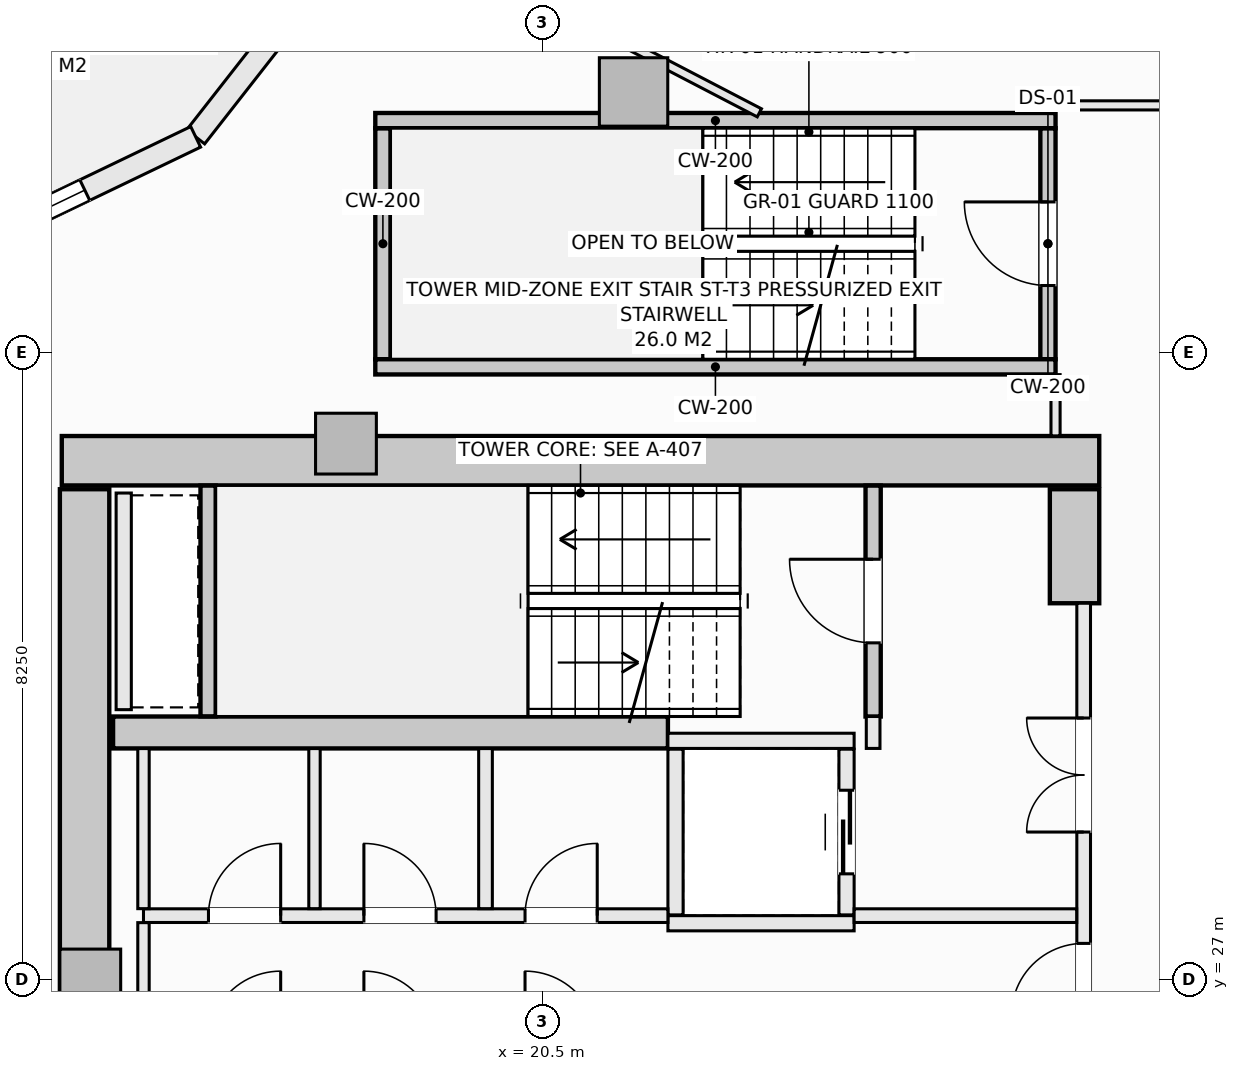
"""IFC4 building model, lengths in metres.
Left out: names, types, materials, properties, quantities, classifications, styles, units other than length and angle.
Written with IfcOpenShell. Run it as: python <this file> out.ifc"""

import sys

from ifc_helpers import new_model, si_unit, direction, frame, frame_2d, origin, origin_2d, place, context, subcontext, project, spatial, rectangle, extrude, element, fill, save


model = new_model("IFC4")
c1 = context("Model", 3, precision=1e-05, world=origin(), true_north=direction((0.0, 1.0)))
c2 = subcontext(c1, "Body", "Model", "MODEL_VIEW")
j1 = project(units=[si_unit("LENGTHUNIT", "METRE"), si_unit("PLANEANGLEUNIT", "RADIAN")], contexts=[c1])
p1 = place(None, origin())
s1 = spatial("IfcSite", under=j1, at=p1, CompositionType="ELEMENT")
p2 = place(p1, origin())
s2 = spatial("IfcBuilding", under=s1, at=p2, CompositionType="ELEMENT")
p3 = place(p2, frame((0.0, 0.0, 169.9)))
s3 = spatial("IfcBuildingStorey", under=s2, at=p3, CompositionType="ELEMENT", Elevation=169.9)
p4 = place(p3, frame((14.175, 33.825, -0.27), z_axis=(0.0, 0.0, 1.0), x_axis=(1.0, 0.0, 0.0)))
e1 = element("IfcWall", 1, at=p4, inside=s3, PredefinedType="SHEAR", context=c2, shape_type="SweptSolid", body=[
    extrude(rectangle(XDim=13.65, YDim=0.65, at=frame_2d((6.825, 0.0))), origin(), (0.0, 0.0, 1.0), 3.4),
])
p5 = place(p3, frame((14.475, 20.55, -0.27), z_axis=(0.0, 0.0, 1.0), x_axis=(0.0, 1.0, 0.0)))
e2 = element("IfcWall", 2, at=p5, inside=s3, PredefinedType="SHEAR", context=c2, shape_type="SweptSolid", body=[
    extrude(rectangle(XDim=12.9, YDim=0.65, at=frame_2d((6.45, 0.0))), origin(), (0.0, 0.0, 1.0), 3.4),
])
p6 = place(p3, frame((27.5, 31.95, -0.27), z_axis=(0.0, 0.0, 1.0), x_axis=(0.0, 1.0, 0.0)))
e3 = element("IfcWall", 3, at=p6, inside=s3, PredefinedType="SHEAR", context=c2, shape_type="SweptSolid", body=[
    extrude(rectangle(XDim=1.5, YDim=0.65, at=frame_2d((0.75, 0.0))), origin(), (0.0, 0.0, 1.0), 3.4),
])
p7 = place(p3, frame((14.85, 30.25, -0.27), z_axis=(0.0, 0.0, 1.0), x_axis=(1.0, 0.0, 0.0)))
e4 = element("IfcWall", 4, at=p7, inside=s3, PredefinedType="SHEAR", context=c2, shape_type="SweptSolid", body=[
    extrude(rectangle(XDim=7.3, YDim=0.42, at=frame_2d((3.65, 0.0))), origin(), (0.0, 0.0, 1.0), 3.4),
])
p8 = place(p3, frame((21.698, 38.677, -0.27), z_axis=(0.0, 0.0, 1.0), x_axis=(1.0, 0.0, 0.0)))
e5 = element("IfcColumn", 5, at=p8, inside=s3, PredefinedType="COLUMN", context=c2, shape_type="SweptSolid", body=[
    extrude(rectangle(XDim=0.9, YDim=0.9, at=origin_2d()), origin(), (0.0, 0.0, 1.0), 3.4),
])
for number, where, z_axis, x_axis in (
    (6, (17.914, 34.05, -0.27), (0.0, 0.0, 1.0), (1.0, 0.0, 0.0)),
    (7, (14.55, 27.0, -0.27), (0.0, 0.0, 1.0), (1.0, 0.0, 0.0)),
):
    element("IfcColumn", number, at=place(p3, frame(where, z_axis=z_axis, x_axis=x_axis)), inside=s3, PredefinedType="PILASTER", context=c2, shape_type="SweptSolid", body=[
        extrude(rectangle(XDim=0.8, YDim=0.8, at=origin_2d()), origin(), (0.0, 0.0, 1.0), 3.4),
    ])
p9 = place(p3, frame((15.937, 38.086, 0.0), z_axis=(0.0, 0.0, 1.0), x_axis=(0.616429245738, 0.787410302828, 0.0)))
e8 = element("IfcWall", 8, at=p9, inside=s3, PredefinedType="SOLIDWALL", context=c2, shape_type="SweptSolid", body=[
    extrude(rectangle(XDim=5.223, YDim=0.3, at=frame_2d((2.612, 0.0))), origin(), (0.0, 0.0, 1.0), 2.653),
])
p10 = place(p9, frame((1.712, 0.0, 0.0)))
e9 = element("IfcOpeningElement", 9, at=p10, cuts=e8, PredefinedType="OPENING", context=c2, shape_type="SweptSolid", body=[
    extrude(rectangle(XDim=1.8, YDim=2.25, at=frame_2d((0.9, 1.125))), frame((0.0, 0.16, 0.0), z_axis=(0.0, -1.0, 0.0), x_axis=(1.0, 0.0, 0.0)), (0.0, 0.0, 1.0), 0.32),
])
p11 = place(p3, frame((11.127, 35.775, 0.0), z_axis=(0.0, 0.0, 1.0), x_axis=(0.901353070301, 0.433085029363, 0.0)))
e10 = element("IfcWall", 10, at=p11, inside=s3, PredefinedType="SOLIDWALL", context=c2, shape_type="SweptSolid", body=[
    extrude(rectangle(XDim=5.336, YDim=0.3, at=frame_2d((2.668, 0.0))), origin(), (0.0, 0.0, 1.0), 2.653),
])
p12 = place(p11, frame((1.618, 0.0, 0.74)))
e11 = element("IfcOpeningElement", 11, at=p12, cuts=e10, PredefinedType="OPENING", context=c2, shape_type="SweptSolid", body=[
    extrude(rectangle(XDim=2.1, YDim=1.7, at=frame_2d((1.05, 0.85))), frame((0.0, 0.16, 0.0), z_axis=(0.0, -1.0, 0.0), x_axis=(1.0, 0.0, 0.0)), (0.0, 0.0, 1.0), 0.32),
])
p13 = place(p3, frame((24.85, 30.46, -0.27), z_axis=(0.0, 0.0, 1.0), x_axis=(0.0, 1.0, 0.0)))
e12 = element("IfcWall", 12, at=p13, inside=s3, PredefinedType="SHEAR", context=c2, shape_type="SweptSolid", body=[
    extrude(rectangle(XDim=3.038, YDim=0.2, at=frame_2d((1.519, 0.0))), origin(), (0.0, 0.0, 1.0), 3.4),
])
p14 = place(p13, frame((0.969, 0.0, 0.27)))
e13 = element("IfcOpeningElement", 13, at=p14, cuts=e12, PredefinedType="OPENING", context=c2, shape_type="SweptSolid", body=[
    extrude(rectangle(XDim=1.1, YDim=2.15, at=frame_2d((0.55, 1.075))), frame((0.0, 0.11, 0.0), z_axis=(0.0, -1.0, 0.0), x_axis=(1.0, 0.0, 0.0)), (0.0, 0.0, 1.0), 0.22),
])
p15 = place(p3, frame((16.1, 30.462, -0.27), z_axis=(0.0, 0.0, 1.0), x_axis=(0.0, 1.0, 0.0)))
e14 = element("IfcWall", 14, at=p15, inside=s3, PredefinedType="SHEAR", context=c2, shape_type="SweptSolid", body=[
    extrude(rectangle(XDim=3.036, YDim=0.2, at=frame_2d((1.518, 0.0))), origin(), (0.0, 0.0, 1.0), 3.4),
])
p16 = place(p3, frame((27.15, 35.16, -0.27), z_axis=(0.0, 0.0, 1.0), x_axis=(0.0, 1.0, 0.0)))
e15 = element("IfcWall", 15, at=p16, inside=s3, PredefinedType="SHEAR", context=c2, shape_type="SweptSolid", body=[
    extrude(rectangle(XDim=3.04, YDim=0.2, at=frame_2d((1.52, 0.0))), origin(), (0.0, 0.0, 1.0), 3.4),
])
p17 = place(p16, frame((0.97, 0.0, 0.27)))
e16 = element("IfcOpeningElement", 16, at=p17, cuts=e15, PredefinedType="OPENING", context=c2, shape_type="SweptSolid", body=[
    extrude(rectangle(XDim=1.1, YDim=2.15, at=frame_2d((0.55, 1.075))), frame((0.0, 0.11, 0.0), z_axis=(0.0, -1.0, 0.0), x_axis=(1.0, 0.0, 0.0)), (0.0, 0.0, 1.0), 0.22),
])
p18 = place(p3, frame((18.4, 35.16, -0.27), z_axis=(0.0, 0.0, 1.0), x_axis=(0.0, 1.0, 0.0)))
e17 = element("IfcWall", 17, at=p18, inside=s3, PredefinedType="SHEAR", context=c2, shape_type="SweptSolid", body=[
    extrude(rectangle(XDim=3.04, YDim=0.2, at=frame_2d((1.52, 0.0))), origin(), (0.0, 0.0, 1.0), 3.4),
])
for number, where, z_axis, x_axis in (
    (18, (18.3, 38.3, -0.27), (0.0, 0.0, 1.0), (1.0, 0.0, 0.0)),
    (19, (18.3, 35.06, -0.27), (0.0, 0.0, 1.0), (1.0, 0.0, 0.0)),
):
    element("IfcWall", number, at=place(p3, frame(where, z_axis=z_axis, x_axis=x_axis)), inside=s3, PredefinedType="SHEAR", context=c2, shape_type="SweptSolid", body=[
        extrude(rectangle(XDim=8.95, YDim=0.2, at=frame_2d((4.475, 0.0))), origin(), (0.0, 0.0, 1.0), 3.4),
    ])
for number, where, z_axis, x_axis in (
    (20, (22.15, 30.14, 0.0), (0.0, 0.0, 1.0), (1.0, 0.0, 0.0)),
    (21, (22.15, 27.74, 0.0), (0.0, 0.0, 1.0), (1.0, 0.0, 0.0)),
):
    element("IfcWall", number, at=place(p3, frame(where, z_axis=z_axis, x_axis=x_axis)), inside=s3, PredefinedType="SOLIDWALL", context=c2, shape_type="SweptSolid", body=[
        extrude(rectangle(XDim=2.45, YDim=0.2, at=frame_2d((1.225, 0.0))), origin(), (0.0, 0.0, 1.0), 3.13),
    ])
p19 = place(p3, frame((22.25, 27.85, 0.0), z_axis=(0.0, 0.0, 1.0), x_axis=(0.0, 1.0, 0.0)))
e22 = element("IfcWall", 22, at=p19, inside=s3, PredefinedType="SOLIDWALL", context=c2, shape_type="SweptSolid", body=[
    extrude(rectangle(XDim=2.18, YDim=0.2, at=frame_2d((1.09, 0.0))), origin(), (0.0, 0.0, 1.0), 3.13),
])
p20 = place(p3, frame((24.5, 27.85, 0.0), z_axis=(0.0, 0.0, 1.0), x_axis=(0.0, 1.0, 0.0)))
e23 = element("IfcWall", 23, at=p20, inside=s3, PredefinedType="SOLIDWALL", context=c2, shape_type="SweptSolid", body=[
    extrude(rectangle(XDim=2.18, YDim=0.2, at=frame_2d((1.09, 0.0))), origin(), (0.0, 0.0, 1.0), 3.13),
])
p21 = place(p20, frame((0.54, 0.0, 0.0)))
e24 = element("IfcOpeningElement", 24, at=p21, cuts=e23, PredefinedType="OPENING", context=c2, shape_type="SweptSolid", body=[
    extrude(rectangle(XDim=1.1, YDim=2.2, at=frame_2d((0.55, 1.1))), frame((0.0, 0.11, 0.0), z_axis=(0.0, -1.0, 0.0), x_axis=(1.0, 0.0, 0.0)), (0.0, 0.0, 1.0), 0.22),
])
p22 = place(p3, frame((14.99, 30.55, 0.0), z_axis=(0.0, 0.0, 1.0), x_axis=(0.0, 1.0, 0.0)))
e25 = element("IfcWall", 25, at=p22, inside=s3, PredefinedType="SOLIDWALL", context=c2, shape_type="SweptSolid", body=[
    extrude(rectangle(XDim=2.85, YDim=0.2, at=frame_2d((1.425, 0.0))), origin(), (0.0, 0.0, 1.0), 3.13),
])
p23 = place(p3, frame((24.85, 30.04, 0.0), z_axis=(0.0, 0.0, 1.0), x_axis=(0.0, 1.0, 0.0)))
e26 = element("IfcWall", 26, at=p23, inside=s3, PredefinedType="SOLIDWALL", context=c2, shape_type="SweptSolid", body=[
    extrude(rectangle(XDim=0.42, YDim=0.18, at=frame_2d((0.21, 0.0))), origin(), (0.0, 0.0, 1.0), 3.13),
])
p24 = place(p3, frame((27.62, 22.05, 0.0), z_axis=(0.0, 0.0, 1.0), x_axis=(0.0, 1.0, 0.0)))
e27 = element("IfcWall", 27, at=p24, inside=s3, PredefinedType="SOLIDWALL", context=c2, shape_type="SweptSolid", body=[
    extrude(rectangle(XDim=9.9, YDim=0.18, at=frame_2d((4.95, 0.0))), origin(), (0.0, 0.0, 1.0), 3.13),
])
p25 = place(p24, frame((4.475, 0.0, 0.0)))
e28 = element("IfcOpeningElement", 28, at=p25, cuts=e27, PredefinedType="OPENING", context=c2, shape_type="SweptSolid", body=[
    extrude(rectangle(XDim=0.95, YDim=2.1, at=frame_2d((0.475, 1.05))), frame((0.0, 0.1, 0.0), z_axis=(0.0, -1.0, 0.0), x_axis=(1.0, 0.0, 0.0)), (0.0, 0.0, 1.0), 0.2),
])
p26 = place(p24, frame((6.89, 0.0, 0.0)))
e29 = element("IfcOpeningElement", 29, at=p26, cuts=e27, PredefinedType="OPENING", context=c2, shape_type="SweptSolid", body=[
    extrude(rectangle(XDim=1.5, YDim=2.2, at=frame_2d((0.75, 1.1))), frame((0.0, 0.1, 0.0), z_axis=(0.0, -1.0, 0.0), x_axis=(1.0, 0.0, 0.0)), (0.0, 0.0, 1.0), 0.2),
])
p27 = place(p24, frame((1.51, 0.0, 0.0)))
e30 = element("IfcOpeningElement", 30, at=p27, cuts=e27, PredefinedType="OPENING", context=c2, shape_type="SweptSolid", body=[
    extrude(rectangle(XDim=1.5, YDim=2.2, at=frame_2d((0.75, 1.1))), frame((0.0, 0.1, 0.0), z_axis=(0.0, -1.0, 0.0), x_axis=(1.0, 0.0, 0.0)), (0.0, 0.0, 1.0), 0.2),
])
p28 = place(p3, frame((15.25, 27.84, 0.0), z_axis=(0.0, 0.0, 1.0), x_axis=(1.0, 0.0, 0.0)))
e31 = element("IfcWall", 31, at=p28, inside=s3, PredefinedType="SOLIDWALL", context=c2, shape_type="SweptSolid", body=[
    extrude(rectangle(XDim=6.9, YDim=0.18, at=frame_2d((3.45, 0.0))), origin(), (0.0, 0.0, 1.0), 3.13),
])
p29 = place(p28, frame((5.02, 0.0, 0.0)))
e32 = element("IfcOpeningElement", 32, at=p29, cuts=e31, PredefinedType="OPENING", context=c2, shape_type="SweptSolid", body=[
    extrude(rectangle(XDim=0.95, YDim=2.1, at=frame_2d((0.475, 1.05))), frame((0.0, 0.1, 0.0), z_axis=(0.0, -1.0, 0.0), x_axis=(1.0, 0.0, 0.0)), (0.0, 0.0, 1.0), 0.2),
])
p30 = place(p28, frame((0.855, 0.0, 0.0)))
e33 = element("IfcOpeningElement", 33, at=p30, cuts=e31, PredefinedType="OPENING", context=c2, shape_type="SweptSolid", body=[
    extrude(rectangle(XDim=0.95, YDim=2.1, at=frame_2d((0.475, 1.05))), frame((0.0, 0.1, 0.0), z_axis=(0.0, -1.0, 0.0), x_axis=(1.0, 0.0, 0.0)), (0.0, 0.0, 1.0), 0.2),
])
p31 = place(p28, frame((2.9, 0.0, 0.0)))
e34 = element("IfcOpeningElement", 34, at=p31, cuts=e31, PredefinedType="OPENING", context=c2, shape_type="SweptSolid", body=[
    extrude(rectangle(XDim=0.95, YDim=2.1, at=frame_2d((0.475, 1.05))), frame((0.0, 0.1, 0.0), z_axis=(0.0, -1.0, 0.0), x_axis=(1.0, 0.0, 0.0)), (0.0, 0.0, 1.0), 0.2),
])
p32 = place(p3, frame((24.6, 27.84, 0.0), z_axis=(0.0, 0.0, 1.0), x_axis=(1.0, 0.0, 0.0)))
e35 = element("IfcWall", 35, at=p32, inside=s3, PredefinedType="SOLIDWALL", context=c2, shape_type="SweptSolid", body=[
    extrude(rectangle(XDim=2.928, YDim=0.18, at=frame_2d((1.464, 0.0))), origin(), (0.0, 0.0, 1.0), 3.13),
])
p33 = place(p3, frame((15.25, 26.252, 0.0), z_axis=(0.0, 0.0, 1.0), x_axis=(0.0, 1.0, 0.0)))
e36 = element("IfcWall", 36, at=p33, inside=s3, PredefinedType="PARTITIONING", context=c2, shape_type="SweptSolid", body=[
    extrude(rectangle(XDim=1.496, YDim=0.15, at=frame_2d((0.748, 0.0))), origin(), (0.0, 0.0, 1.0), 3.13),
])
p34 = place(p3, frame((15.25, 27.932, 0.0), z_axis=(0.0, 0.0, 1.0), x_axis=(0.0, 1.0, 0.0)))
e37 = element("IfcWall", 37, at=p34, inside=s3, PredefinedType="PARTITIONING", context=c2, shape_type="SweptSolid", body=[
    extrude(rectangle(XDim=2.106, YDim=0.15, at=frame_2d((1.053, 0.0))), origin(), (0.0, 0.0, 1.0), 3.13),
])
p35 = place(p3, frame((19.75, 27.932, 0.0), z_axis=(0.0, 0.0, 1.0), x_axis=(0.0, 1.0, 0.0)))
e38 = element("IfcWall", 38, at=p35, inside=s3, PredefinedType="SOLIDWALL", context=c2, shape_type="SweptSolid", body=[
    extrude(rectangle(XDim=2.106, YDim=0.18, at=frame_2d((1.053, 0.0))), origin(), (0.0, 0.0, 1.0), 3.13),
])
p36 = place(p3, frame((17.5, 27.932, 0.0), z_axis=(0.0, 0.0, 1.0), x_axis=(0.0, 1.0, 0.0)))
e39 = element("IfcWall", 39, at=p36, inside=s3, PredefinedType="PARTITIONING", context=c2, shape_type="SweptSolid", body=[
    extrude(rectangle(XDim=2.106, YDim=0.15, at=frame_2d((1.053, 0.0))), origin(), (0.0, 0.0, 1.0), 3.13),
])
p37 = place(p3, frame((27.25, 34.152, 0.0), z_axis=(0.0, 0.0, 1.0), x_axis=(0.0, 1.0, 0.0)))
e40 = element("IfcWall", 40, at=p37, inside=s3, PredefinedType="PARTITIONING", context=c2, shape_type="SweptSolid", body=[
    extrude(rectangle(XDim=0.806, YDim=0.12, at=frame_2d((0.403, 0.0))), origin(), (0.0, 0.0, 1.0), 3.13),
])
p38 = place(p3, frame((27.25, 38.5, 0.0), z_axis=(0.0, 0.0, 1.0), x_axis=(1.0, 0.0, 0.0)))
e41 = element("IfcWall", 41, at=p38, inside=s3, PredefinedType="PARTITIONING", context=c2, shape_type="SweptSolid", body=[
    extrude(rectangle(XDim=2.53, YDim=0.12, at=frame_2d((1.265, 0.0))), origin(), (0.0, 0.0, 1.0), 3.13),
])
p39 = place(p3, frame((18.396, 40.981, 0.0), z_axis=(0.0, 0.0, 1.0), x_axis=(0.887120213162, -0.461538435452, 0.0)))
e42 = element("IfcWall", 42, at=p39, inside=s3, PredefinedType="PARTITIONING", context=c2, shape_type="SweptSolid", body=[
    extrude(rectangle(XDim=5.588, YDim=0.12, at=frame_2d((2.794, 0.0))), origin(), (0.0, 0.0, 1.0), 2.505),
])
p40 = place(p12, origin())
e43 = element("IfcWindow", 43, at=p40, inside=s3, PartitioningType="SINGLE_PANEL", PredefinedType="WINDOW", context=c2, shape_type="SweptSolid", body=[
    extrude(rectangle(XDim=2.1, YDim=1.7, at=frame_2d((1.05, 0.85))), frame((0.0, 0.03, 0.0), z_axis=(0.0, -1.0, 0.0), x_axis=(1.0, 0.0, 0.0)), (0.0, 0.0, 1.0), 0.06),
])
fill(e11, e43)
p41 = place(p14, origin())
e44 = element("IfcDoor", 44, at=p41, inside=s3, OperationType="SINGLE_SWING_RIGHT", PredefinedType="DOOR", context=c2, shape_type="SweptSolid", body=[
    extrude(rectangle(XDim=1.1, YDim=2.15, at=frame_2d((0.55, 1.075))), frame((0.0, 0.025, 0.0), z_axis=(0.0, -1.0, 0.0), x_axis=(1.0, 0.0, 0.0)), (0.0, 0.0, 1.0), 0.05),
])
fill(e13, e44)
p42 = place(p17, origin())
e45 = element("IfcDoor", 45, at=p42, inside=s3, OperationType="SINGLE_SWING_RIGHT", PredefinedType="DOOR", context=c2, shape_type="SweptSolid", body=[
    extrude(rectangle(XDim=1.1, YDim=2.15, at=frame_2d((0.55, 1.075))), frame((0.0, 0.025, 0.0), z_axis=(0.0, -1.0, 0.0), x_axis=(1.0, 0.0, 0.0)), (0.0, 0.0, 1.0), 0.05),
])
fill(e16, e45)
p43 = place(p21, origin())
e46 = element("IfcDoor", 46, at=p43, inside=s3, OperationType="SLIDING_TO_LEFT", PredefinedType="DOOR", context=c2, shape_type="SweptSolid", body=[
    extrude(rectangle(XDim=1.1, YDim=2.2, at=frame_2d((0.55, 1.1))), frame((0.0, 0.025, 0.0), z_axis=(0.0, -1.0, 0.0), x_axis=(1.0, 0.0, 0.0)), (0.0, 0.0, 1.0), 0.05),
])
fill(e24, e46)
p44 = place(p25, origin())
e47 = element("IfcDoor", 47, at=p44, inside=s3, OperationType="SINGLE_SWING_LEFT", PredefinedType="DOOR", context=c2, shape_type="SweptSolid", body=[
    extrude(rectangle(XDim=0.95, YDim=2.1, at=frame_2d((0.475, 1.05))), frame((0.0, 0.025, 0.0), z_axis=(0.0, -1.0, 0.0), x_axis=(1.0, 0.0, 0.0)), (0.0, 0.0, 1.0), 0.05),
])
fill(e28, e47)
p45 = place(p26, origin())
e48 = element("IfcDoor", 48, at=p45, inside=s3, OperationType="DOUBLE_DOOR_SINGLE_SWING", PredefinedType="DOOR", context=c2, shape_type="SweptSolid", body=[
    extrude(rectangle(XDim=1.5, YDim=2.2, at=frame_2d((0.75, 1.1))), frame((0.0, 0.025, 0.0), z_axis=(0.0, -1.0, 0.0), x_axis=(1.0, 0.0, 0.0)), (0.0, 0.0, 1.0), 0.05),
])
fill(e29, e48)
p46 = place(p29, origin())
e49 = element("IfcDoor", 49, at=p46, inside=s3, OperationType="SINGLE_SWING_RIGHT", PredefinedType="DOOR", context=c2, shape_type="SweptSolid", body=[
    extrude(rectangle(XDim=0.95, YDim=2.1, at=frame_2d((0.475, 1.05))), frame((0.0, 0.025, 0.0), z_axis=(0.0, -1.0, 0.0), x_axis=(1.0, 0.0, 0.0)), (0.0, 0.0, 1.0), 0.05),
])
fill(e32, e49)
p47 = place(p30, origin())
e50 = element("IfcDoor", 50, at=p47, inside=s3, OperationType="SINGLE_SWING_RIGHT", PredefinedType="DOOR", context=c2, shape_type="SweptSolid", body=[
    extrude(rectangle(XDim=0.95, YDim=2.1, at=frame_2d((0.475, 1.05))), frame((0.0, 0.025, 0.0), z_axis=(0.0, -1.0, 0.0), x_axis=(1.0, 0.0, 0.0)), (0.0, 0.0, 1.0), 0.05),
])
fill(e33, e50)
p48 = place(p31, origin())
e51 = element("IfcDoor", 51, at=p48, inside=s3, OperationType="SINGLE_SWING_LEFT", PredefinedType="DOOR", context=c2, shape_type="SweptSolid", body=[
    extrude(rectangle(XDim=0.95, YDim=2.1, at=frame_2d((0.475, 1.05))), frame((0.0, 0.025, 0.0), z_axis=(0.0, -1.0, 0.0), x_axis=(1.0, 0.0, 0.0)), (0.0, 0.0, 1.0), 0.05),
])
fill(e34, e51)
save(model, sys.argv[1])
